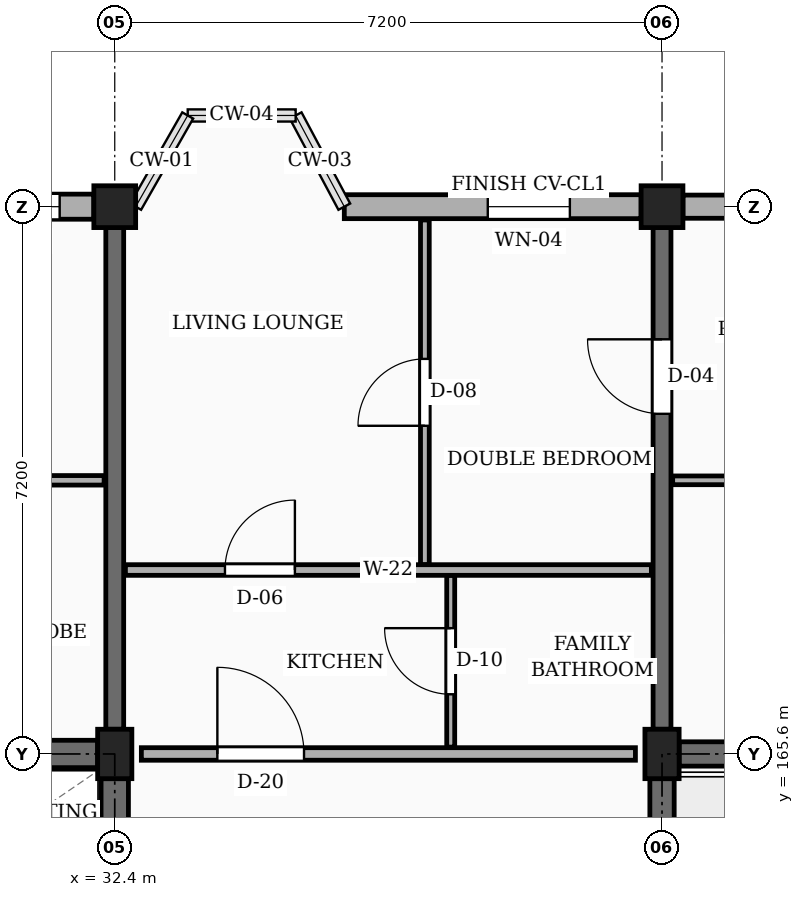
"""IFC4 building model, lengths in metres.
Left out: names, types, materials, properties, quantities, classifications, styles, units other than length and angle.
Written with IfcOpenShell. Run it as: python <this file> out.ifc"""

import sys

from ifc_helpers import new_model, si_unit, direction, frame, frame_2d, origin, origin_2d, place, context, subcontext, project, spatial, rectangle, extrude, element, fill, save


model = new_model("IFC4")
c1 = context("Model", 3, precision=1e-05, world=origin(), true_north=direction((0.0, 1.0)))
c2 = subcontext(c1, "Body", "Model", "MODEL_VIEW")
j1 = project(units=[si_unit("LENGTHUNIT", "METRE"), si_unit("PLANEANGLEUNIT", "RADIAN")], contexts=[c1])
p1 = place(None, origin())
s1 = spatial("IfcSite", under=j1, at=p1, CompositionType="ELEMENT")
p2 = place(p1, origin())
s2 = spatial("IfcBuilding", under=s1, at=p2, CompositionType="ELEMENT")
p3 = place(p2, frame((0.0, 0.0, 17.1)))
s3 = spatial("IfcBuildingStorey", under=s2, at=p3, CompositionType="ELEMENT", Elevation=17.1)
p4 = place(p3, frame((32.4, 165.6, 0.0), z_axis=(0.0, 0.0, 1.0), x_axis=(1.0, 0.0, 0.0)))
e1 = element("IfcColumn", 1, at=p4, inside=s3, PredefinedType="COLUMN", context=c2, shape_type="SweptSolid", body=[
    extrude(rectangle(XDim=0.45, YDim=0.65, at=origin_2d()), origin(), (0.0, 0.0, 1.0), 3.15),
])
p5 = place(p3, frame((32.4, 172.8, 0.0), z_axis=(0.0, 0.0, 1.0), x_axis=(1.0, 0.0, 0.0)))
e2 = element("IfcColumn", 2, at=p5, inside=s3, PredefinedType="COLUMN", context=c2, shape_type="SweptSolid", body=[
    extrude(rectangle(XDim=0.55, YDim=0.55, at=origin_2d()), origin(), (0.0, 0.0, 1.0), 3.15),
])
p6 = place(p3, frame((39.6, 165.6, 0.0), z_axis=(0.0, 0.0, 1.0), x_axis=(1.0, 0.0, 0.0)))
e3 = element("IfcColumn", 3, at=p6, inside=s3, PredefinedType="COLUMN", context=c2, shape_type="SweptSolid", body=[
    extrude(rectangle(XDim=0.45, YDim=0.65, at=origin_2d()), origin(), (0.0, 0.0, 1.0), 3.15),
])
p7 = place(p3, frame((39.6, 172.8, 0.0), z_axis=(0.0, 0.0, 1.0), x_axis=(1.0, 0.0, 0.0)))
e4 = element("IfcColumn", 4, at=p7, inside=s3, PredefinedType="COLUMN", context=c2, shape_type="SweptSolid", body=[
    extrude(rectangle(XDim=0.55, YDim=0.55, at=origin_2d()), origin(), (0.0, 0.0, 1.0), 3.15),
])
p8 = place(p3, frame((32.4, 165.925, 0.0), z_axis=(0.0, 0.0, 1.0), x_axis=(0.0, 1.0, 0.0)))
e5 = element("IfcWall", 5, at=p8, inside=s3, PredefinedType="SOLIDWALL", context=c2, shape_type="SweptSolid", body=[
    extrude(rectangle(XDim=6.6, YDim=0.235, at=frame_2d((3.3, 0.0))), origin(), (0.0, 0.0, 1.0), 2.185),
])
p9 = place(p3, frame((39.6, 165.925, 0.0), z_axis=(0.0, 0.0, 1.0), x_axis=(0.0, 1.0, 0.0)))
e6 = element("IfcWall", 6, at=p9, inside=s3, PredefinedType="SOLIDWALL", context=c2, shape_type="SweptSolid", body=[
    extrude(rectangle(XDim=6.6, YDim=0.235, at=frame_2d((3.3, 0.0))), origin(), (0.0, 0.0, 1.0), 2.185),
])
p10 = place(p9, frame((4.15, 0.0, 0.0)))
e7 = element("IfcOpeningElement", 7, at=p10, cuts=e6, PredefinedType="OPENING", context=c2, shape_type="SweptSolid", body=[
    extrude(rectangle(XDim=0.98, YDim=2.12, at=frame_2d((0.49, 1.06))), frame((0.0, 0.127, 0.0), z_axis=(0.0, -1.0, 0.0), x_axis=(1.0, 0.0, 0.0)), (0.0, 0.0, 1.0), 0.255),
])
p11 = place(p3, frame((46.525, 172.8, 0.0), z_axis=(0.0, 0.0, 1.0), x_axis=(-1.0, 0.0, 0.0)))
e8 = element("IfcWall", 8, at=p11, inside=s3, PredefinedType="SOLIDWALL", context=c2, shape_type="SweptSolid", body=[
    extrude(rectangle(XDim=6.65, YDim=0.305, at=frame_2d((3.325, 0.0))), origin(), (0.0, 0.0, 1.0), 2.455),
])
p12 = place(p11, frame((0.45, 0.0, 0.78)))
e9 = element("IfcOpeningElement", 9, at=p12, cuts=e8, PredefinedType="OPENING", context=c2, shape_type="SweptSolid", body=[
    extrude(rectangle(XDim=0.92, YDim=1.15, at=frame_2d((0.46, 0.575))), frame((0.0, 0.163, 0.0), z_axis=(0.0, -1.0, 0.0), x_axis=(1.0, 0.0, 0.0)), (0.0, 0.0, 1.0), 0.325),
])
p13 = place(p11, frame((4.65, 0.0, 0.78)))
e10 = element("IfcOpeningElement", 10, at=p13, cuts=e8, PredefinedType="OPENING", context=c2, shape_type="SweptSolid", body=[
    extrude(rectangle(XDim=1.08, YDim=1.15, at=frame_2d((0.54, 0.575))), frame((0.0, 0.163, 0.0), z_axis=(0.0, -1.0, 0.0), x_axis=(1.0, 0.0, 0.0)), (0.0, 0.0, 1.0), 0.325),
])
p14 = place(p3, frame((39.325, 172.8, 0.0), z_axis=(0.0, 0.0, 1.0), x_axis=(-1.0, 0.0, 0.0)))
e11 = element("IfcWall", 11, at=p14, inside=s3, PredefinedType="SOLIDWALL", context=c2, shape_type="SweptSolid", body=[
    extrude(rectangle(XDim=3.905, YDim=0.315, at=frame_2d((1.953, 0.0))), origin(), (0.0, 0.0, 1.0), 2.455),
])
p15 = place(p14, frame((0.938, 0.0, 0.78)))
e12 = element("IfcOpeningElement", 12, at=p15, cuts=e11, PredefinedType="OPENING", context=c2, shape_type="SweptSolid", body=[
    extrude(rectangle(XDim=1.08, YDim=1.15, at=frame_2d((0.54, 0.575))), frame((0.0, 0.167, 0.0), z_axis=(0.0, -1.0, 0.0), x_axis=(1.0, 0.0, 0.0)), (0.0, 0.0, 1.0), 0.335),
])
p16 = place(p3, frame((32.125, 172.8, 0.0), z_axis=(0.0, 0.0, 1.0), x_axis=(-1.0, 0.0, 0.0)))
e13 = element("IfcWall", 13, at=p16, inside=s3, PredefinedType="SOLIDWALL", context=c2, shape_type="SweptSolid", body=[
    extrude(rectangle(XDim=6.65, YDim=0.33, at=frame_2d((3.325, 0.0))), origin(), (0.0, 0.0, 1.0), 2.455),
])
p17 = place(p16, frame((0.45, 0.0, 0.78)))
e14 = element("IfcOpeningElement", 14, at=p17, cuts=e13, PredefinedType="OPENING", context=c2, shape_type="SweptSolid", body=[
    extrude(rectangle(XDim=1.16, YDim=1.15, at=frame_2d((0.58, 0.575))), frame((0.0, 0.175, 0.0), z_axis=(0.0, -1.0, 0.0), x_axis=(1.0, 0.0, 0.0)), (0.0, 0.0, 1.0), 0.35),
])
p18 = place(p16, frame((4.65, 0.0, 0.78)))
e15 = element("IfcOpeningElement", 15, at=p18, cuts=e13, PredefinedType="OPENING", context=c2, shape_type="SweptSolid", body=[
    extrude(rectangle(XDim=1.32, YDim=1.15, at=frame_2d((0.66, 0.575))), frame((0.0, 0.175, 0.0), z_axis=(0.0, -1.0, 0.0), x_axis=(1.0, 0.0, 0.0)), (0.0, 0.0, 1.0), 0.35),
])
p19 = place(p3, frame((25.425, 165.6, 0.0), z_axis=(0.0, 0.0, 1.0), x_axis=(1.0, 0.0, 0.0)))
e16 = element("IfcWall", 16, at=p19, inside=s3, PredefinedType="SHEAR", context=c2, shape_type="SweptSolid", body=[
    extrude(rectangle(XDim=6.75, YDim=0.36, at=frame_2d((3.375, 0.0))), origin(), (0.0, 0.0, 1.0), 2.885),
])
p20 = place(p3, frame((32.4, 158.725, 0.0), z_axis=(0.0, 0.0, 1.0), x_axis=(0.0, 1.0, 0.0)))
e17 = element("IfcWall", 17, at=p20, inside=s3, PredefinedType="SHEAR", context=c2, shape_type="SweptSolid", body=[
    extrude(rectangle(XDim=6.55, YDim=0.36, at=frame_2d((3.275, 0.0))), origin(), (0.0, 0.0, 1.0), 2.885),
])
p21 = place(p3, frame((39.6, 158.725, 0.0), z_axis=(0.0, 0.0, 1.0), x_axis=(0.0, 1.0, 0.0)))
e18 = element("IfcWall", 18, at=p21, inside=s3, PredefinedType="SHEAR", context=c2, shape_type="SweptSolid", body=[
    extrude(rectangle(XDim=6.55, YDim=0.32, at=frame_2d((3.275, 0.0))), origin(), (0.0, 0.0, 1.0), 2.885),
])
p22 = place(p3, frame((39.825, 165.6, 0.0), z_axis=(0.0, 0.0, 1.0), x_axis=(1.0, 0.0, 0.0)))
e19 = element("IfcWall", 19, at=p22, inside=s3, PredefinedType="SHEAR", context=c2, shape_type="SweptSolid", body=[
    extrude(rectangle(XDim=6.75, YDim=0.32, at=frame_2d((3.375, 0.0))), origin(), (0.0, 0.0, 1.0), 2.885),
])
p23 = place(p3, frame((32.75, 165.6, 0.0), z_axis=(0.0, 0.0, 1.0), x_axis=(1.0, 0.0, 0.0)))
e20 = element("IfcWall", 20, at=p23, inside=s3, PredefinedType="PARTITIONING", context=c2, shape_type="SweptSolid", body=[
    extrude(rectangle(XDim=6.5, YDim=0.165, at=frame_2d((3.25, 0.0))), origin(), (0.0, 0.0, 1.0), 2.235),
])
p24 = place(p23, frame((1.0, 0.0, 0.0)))
e21 = element("IfcOpeningElement", 21, at=p24, cuts=e20, PredefinedType="OPENING", context=c2, shape_type="SweptSolid", body=[
    extrude(rectangle(XDim=1.14, YDim=2.18, at=frame_2d((0.57, 1.09))), frame((0.0, 0.093, 0.0), z_axis=(0.0, -1.0, 0.0), x_axis=(1.0, 0.0, 0.0)), (0.0, 0.0, 1.0), 0.185),
])
p25 = place(p3, frame((25.34, 169.2, 0.0), z_axis=(0.0, 0.0, 1.0), x_axis=(1.0, 0.0, 0.0)))
e22 = element("IfcWall", 22, at=p25, inside=s3, PredefinedType="PARTITIONING", context=c2, shape_type="SweptSolid", body=[
    extrude(rectangle(XDim=6.92, YDim=0.125, at=frame_2d((3.46, 0.0))), origin(), (0.0, 0.0, 1.0), 2.32),
])
p26 = place(p25, frame((1.05, 0.0, 0.0)))
e23 = element("IfcOpeningElement", 23, at=p26, cuts=e22, PredefinedType="OPENING", context=c2, shape_type="SweptSolid", body=[
    extrude(rectangle(XDim=0.87, YDim=2.05, at=frame_2d((0.435, 1.025))), frame((0.0, 0.073, 0.0), z_axis=(0.0, -1.0, 0.0), x_axis=(1.0, 0.0, 0.0)), (0.0, 0.0, 1.0), 0.145),
])
p27 = place(p25, frame((4.45, 0.0, 0.0)))
e24 = element("IfcOpeningElement", 24, at=p27, cuts=e22, PredefinedType="OPENING", context=c2, shape_type="SweptSolid", body=[
    extrude(rectangle(XDim=0.88, YDim=2.08, at=frame_2d((0.44, 1.04))), frame((0.0, 0.073, 0.0), z_axis=(0.0, -1.0, 0.0), x_axis=(1.0, 0.0, 0.0)), (0.0, 0.0, 1.0), 0.145),
])
p28 = place(p3, frame((36.48, 168.09, 0.0), z_axis=(0.0, 0.0, 1.0), x_axis=(0.0, 1.0, 0.0)))
e25 = element("IfcWall", 25, at=p28, inside=s3, PredefinedType="PARTITIONING", context=c2, shape_type="SweptSolid", body=[
    extrude(rectangle(XDim=4.535, YDim=0.115, at=frame_2d((2.268, 0.0))), origin(), (0.0, 0.0, 1.0), 2.32),
])
p29 = place(p28, frame((1.827, 0.0, 0.0)))
e26 = element("IfcOpeningElement", 26, at=p29, cuts=e25, PredefinedType="OPENING", context=c2, shape_type="SweptSolid", body=[
    extrude(rectangle(XDim=0.88, YDim=2.08, at=frame_2d((0.44, 1.04))), frame((0.0, 0.067, 0.0), z_axis=(0.0, -1.0, 0.0), x_axis=(1.0, 0.0, 0.0)), (0.0, 0.0, 1.0), 0.135),
])
p30 = place(p3, frame((36.82, 165.69, 0.0), z_axis=(0.0, 0.0, 1.0), x_axis=(0.0, 1.0, 0.0)))
e27 = element("IfcWall", 27, at=p30, inside=s3, PredefinedType="PARTITIONING", context=c2, shape_type="SweptSolid", body=[
    extrude(rectangle(XDim=2.26, YDim=0.105, at=frame_2d((1.13, 0.0))), origin(), (0.0, 0.0, 1.0), 2.32),
])
p31 = place(p30, frame((0.695, 0.0, 0.0)))
e28 = element("IfcOpeningElement", 28, at=p31, cuts=e27, PredefinedType="OPENING", context=c2, shape_type="SweptSolid", body=[
    extrude(rectangle(XDim=0.87, YDim=2.05, at=frame_2d((0.435, 1.025))), frame((0.0, 0.062, 0.0), z_axis=(0.0, -1.0, 0.0), x_axis=(1.0, 0.0, 0.0)), (0.0, 0.0, 1.0), 0.125),
])
p32 = place(p3, frame((32.54, 168.02, 0.0), z_axis=(0.0, 0.0, 1.0), x_axis=(1.0, 0.0, 0.0)))
e29 = element("IfcWall", 29, at=p32, inside=s3, PredefinedType="PARTITIONING", context=c2, shape_type="SweptSolid", body=[
    extrude(rectangle(XDim=6.92, YDim=0.14, at=frame_2d((3.46, 0.0))), origin(), (0.0, 0.0, 1.0), 2.32),
])
p33 = place(p32, frame((1.31, 0.0, 0.0)))
e30 = element("IfcOpeningElement", 30, at=p33, cuts=e29, PredefinedType="OPENING", context=c2, shape_type="SweptSolid", body=[
    extrude(rectangle(XDim=0.92, YDim=2.1, at=frame_2d((0.46, 1.05))), frame((0.0, 0.08, 0.0), z_axis=(0.0, -1.0, 0.0), x_axis=(1.0, 0.0, 0.0)), (0.0, 0.0, 1.0), 0.16),
])
p34 = place(p3, frame((39.74, 169.2, 0.0), z_axis=(0.0, 0.0, 1.0), x_axis=(1.0, 0.0, 0.0)))
e31 = element("IfcWall", 31, at=p34, inside=s3, PredefinedType="PARTITIONING", context=c2, shape_type="SweptSolid", body=[
    extrude(rectangle(XDim=6.92, YDim=0.115, at=frame_2d((3.46, 0.0))), origin(), (0.0, 0.0, 1.0), 2.32),
])
p35 = place(p34, frame((1.05, 0.0, 0.0)))
e32 = element("IfcOpeningElement", 32, at=p35, cuts=e31, PredefinedType="OPENING", context=c2, shape_type="SweptSolid", body=[
    extrude(rectangle(XDim=0.87, YDim=2.05, at=frame_2d((0.435, 1.025))), frame((0.0, 0.067, 0.0), z_axis=(0.0, -1.0, 0.0), x_axis=(1.0, 0.0, 0.0)), (0.0, 0.0, 1.0), 0.135),
])
p36 = place(p34, frame((4.45, 0.0, 0.0)))
e33 = element("IfcOpeningElement", 33, at=p36, cuts=e31, PredefinedType="OPENING", context=c2, shape_type="SweptSolid", body=[
    extrude(rectangle(XDim=0.88, YDim=2.08, at=frame_2d((0.44, 1.04))), frame((0.0, 0.067, 0.0), z_axis=(0.0, -1.0, 0.0), x_axis=(1.0, 0.0, 0.0)), (0.0, 0.0, 1.0), 0.135),
])
p37 = place(p15, origin())
e34 = element("IfcWindow", 34, at=p37, inside=s3, PartitioningType="SINGLE_PANEL", PredefinedType="WINDOW", context=c2, shape_type="SweptSolid", body=[
    extrude(rectangle(XDim=1.08, YDim=1.15, at=frame_2d((0.54, 0.575))), frame((0.0, 0.03, 0.0), z_axis=(0.0, -1.0, 0.0), x_axis=(1.0, 0.0, 0.0)), (0.0, 0.0, 1.0), 0.06),
])
fill(e12, e34)
p38 = place(p17, origin())
e35 = element("IfcWindow", 35, at=p38, inside=s3, PartitioningType="SINGLE_PANEL", PredefinedType="WINDOW", context=c2, shape_type="SweptSolid", body=[
    extrude(rectangle(XDim=1.16, YDim=1.15, at=frame_2d((0.58, 0.575))), frame((0.0, 0.03, 0.0), z_axis=(0.0, -1.0, 0.0), x_axis=(1.0, 0.0, 0.0)), (0.0, 0.0, 1.0), 0.06),
])
fill(e14, e35)
p39 = place(p24, origin())
e36 = element("IfcDoor", 36, at=p39, inside=s3, OperationType="SINGLE_SWING_LEFT", PredefinedType="DOOR", context=c2, shape_type="SweptSolid", body=[
    extrude(rectangle(XDim=1.14, YDim=2.18, at=frame_2d((0.57, 1.09))), frame((0.0, 0.025, 0.0), z_axis=(0.0, -1.0, 0.0), x_axis=(1.0, 0.0, 0.0)), (0.0, 0.0, 1.0), 0.05),
])
fill(e21, e36)
p40 = place(p29, origin())
e37 = element("IfcDoor", 37, at=p40, inside=s3, OperationType="SINGLE_SWING_LEFT", PredefinedType="DOOR", context=c2, shape_type="SweptSolid", body=[
    extrude(rectangle(XDim=0.88, YDim=2.08, at=frame_2d((0.44, 1.04))), frame((0.0, 0.025, 0.0), z_axis=(0.0, -1.0, 0.0), x_axis=(1.0, 0.0, 0.0)), (0.0, 0.0, 1.0), 0.05),
])
fill(e26, e37)
p41 = place(p31, origin())
e38 = element("IfcDoor", 38, at=p41, inside=s3, OperationType="SINGLE_SWING_RIGHT", PredefinedType="DOOR", context=c2, shape_type="SweptSolid", body=[
    extrude(rectangle(XDim=0.87, YDim=2.05, at=frame_2d((0.435, 1.025))), frame((0.0, 0.025, 0.0), z_axis=(0.0, -1.0, 0.0), x_axis=(1.0, 0.0, 0.0)), (0.0, 0.0, 1.0), 0.05),
])
fill(e28, e38)
p42 = place(p33, origin())
e39 = element("IfcDoor", 39, at=p42, inside=s3, OperationType="SINGLE_SWING_RIGHT", PredefinedType="DOOR", context=c2, shape_type="SweptSolid", body=[
    extrude(rectangle(XDim=0.92, YDim=2.1, at=frame_2d((0.46, 1.05))), frame((0.0, 0.025, 0.0), z_axis=(0.0, -1.0, 0.0), x_axis=(1.0, 0.0, 0.0)), (0.0, 0.0, 1.0), 0.05),
])
fill(e30, e39)
p43 = place(p10, origin())
e40 = element("IfcDoor", 40, at=p43, inside=s3, OperationType="SINGLE_SWING_RIGHT", PredefinedType="DOOR", context=c2, shape_type="SweptSolid", body=[
    extrude(rectangle(XDim=0.98, YDim=2.12, at=frame_2d((0.49, 1.06))), frame((0.0, 0.025, 0.0), z_axis=(0.0, -1.0, 0.0), x_axis=(1.0, 0.0, 0.0)), (0.0, 0.0, 1.0), 0.05),
])
fill(e7, e40)
save(model, sys.argv[1])
